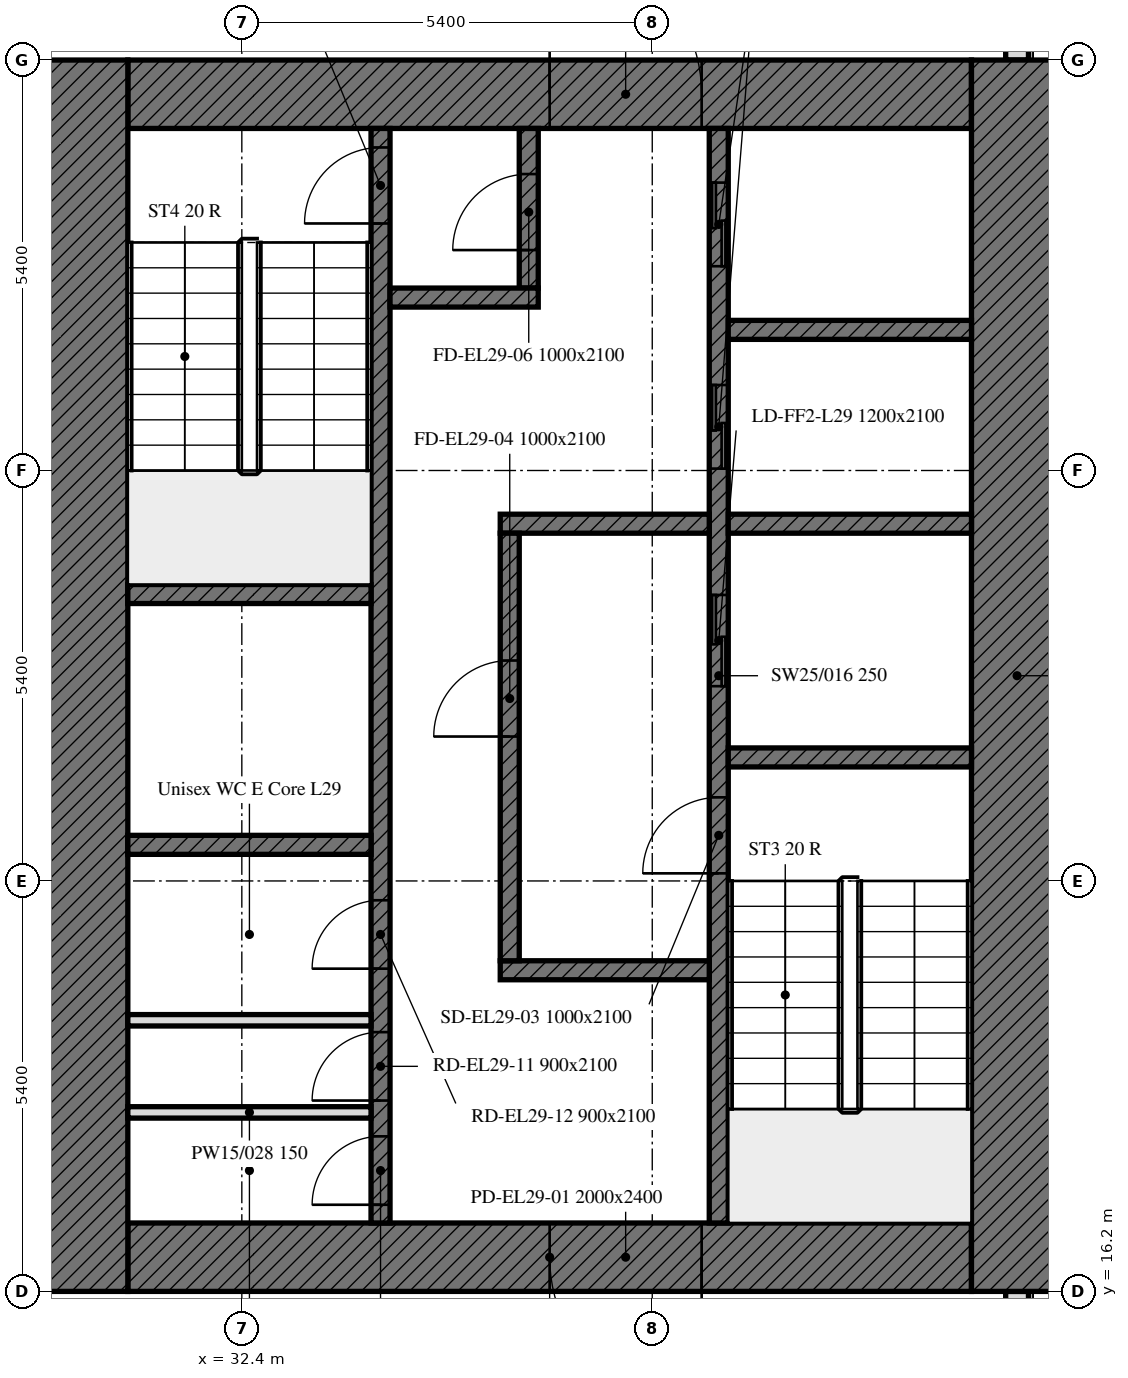
"""IFC4 building model, lengths in metres.
Left out: names, types, materials, properties, quantities, classifications, styles, units other than length and angle.
Written with IfcOpenShell. Run it as: python <this file> out.ifc"""

import sys

from ifc_helpers import new_model, si_unit, direction, frame, frame_2d, origin, place, context, subcontext, project, spatial, rectangle, extrude, element, fill, save


model = new_model("IFC4")
c1 = context("Model", 3, precision=1e-05, world=origin(), true_north=direction((0.0, 1.0)))
c2 = subcontext(c1, "Body", "Model", "MODEL_VIEW")
j1 = project(units=[si_unit("LENGTHUNIT", "METRE"), si_unit("PLANEANGLEUNIT", "RADIAN")], contexts=[c1])
p1 = place(None, origin())
s1 = spatial("IfcSite", under=j1, at=p1, CompositionType="ELEMENT")
p2 = place(p1, origin())
s2 = spatial("IfcBuilding", under=s1, at=p2, CompositionType="ELEMENT")
p3 = place(p2, frame((0.0, 0.0, 122.0)))
s3 = spatial("IfcBuildingStorey", under=s2, at=p3, CompositionType="ELEMENT", Elevation=122.0)
p4 = place(p3, frame((42.6, 10.986, 0.0), z_axis=(0.0, 0.0, 1.0), x_axis=(0.0, 1.0, 0.0)))
e1 = element("IfcWall", 1, at=p4, inside=s3, PredefinedType="SOLIDWALL", context=c2, shape_type="SweptSolid", body=[
    extrude(rectangle(XDim=5.214, YDim=0.3, at=frame_2d((2.607, 0.0))), origin(), (0.0, 0.0, 1.0), 3.3),
])
p5 = place(p3, frame((42.6, 32.4, 0.0), z_axis=(0.0, 0.0, 1.0), x_axis=(0.0, 1.0, 0.0)))
e2 = element("IfcWall", 2, at=p5, inside=s3, PredefinedType="SOLIDWALL", context=c2, shape_type="SweptSolid", body=[
    extrude(rectangle(XDim=10.614, YDim=0.3, at=frame_2d((5.307, 0.0))), origin(), (0.0, 0.0, 1.0), 3.3),
])
p6 = place(p5, frame((6.4, 0.0, 0.9)))
e3 = element("IfcOpeningElement", 3, at=p6, cuts=e2, PredefinedType="OPENING", context=c2, shape_type="SweptSolid", body=[
    extrude(rectangle(XDim=3.4, YDim=1.7, at=frame_2d((1.7, 0.85))), frame((0.0, 0.16, 0.0), z_axis=(0.0, -1.0, 0.0), x_axis=(1.0, 0.0, 0.0)), (0.0, 0.0, 1.0), 0.32),
])
p7 = place(p3, frame((42.0, 16.65, 0.0), z_axis=(0.0, 0.0, 1.0), x_axis=(-1.0, 0.0, 0.0)))
e4 = element("IfcWall", 4, at=p7, inside=s3, PredefinedType="SOLIDWALL", context=c2, shape_type="SweptSolid", body=[
    extrude(rectangle(XDim=11.1, YDim=0.9, at=frame_2d((5.55, 0.0))), origin(), (0.0, 0.0, 1.0), 3.3),
])
p8 = place(p7, frame((3.55, 0.0, 0.0)))
e5 = element("IfcOpeningElement", 5, at=p8, cuts=e4, PredefinedType="OPENING", context=c2, shape_type="SweptSolid", body=[
    extrude(rectangle(XDim=2.0, YDim=2.4, at=frame_2d((1.0, 1.2))), frame((0.0, 0.45, 0.0), z_axis=(0.0, -1.0, 0.0), x_axis=(1.0, 0.0, 0.0)), (0.0, 0.0, 1.0), 0.9),
])
p9 = place(p3, frame((30.9, 31.95, 0.0), z_axis=(0.0, 0.0, 1.0), x_axis=(1.0, 0.0, 0.0)))
e6 = element("IfcWall", 6, at=p9, inside=s3, PredefinedType="SOLIDWALL", context=c2, shape_type="SweptSolid", body=[
    extrude(rectangle(XDim=11.1, YDim=0.9, at=frame_2d((5.55, 0.0))), origin(), (0.0, 0.0, 1.0), 3.3),
])
p10 = place(p9, frame((5.55, 0.0, 0.0)))
e7 = element("IfcOpeningElement", 7, at=p10, cuts=e6, PredefinedType="OPENING", context=c2, shape_type="SweptSolid", body=[
    extrude(rectangle(XDim=2.0, YDim=2.4, at=frame_2d((1.0, 1.2))), frame((0.0, 0.45, 0.0), z_axis=(0.0, -1.0, 0.0), x_axis=(1.0, 0.0, 0.0)), (0.0, 0.0, 1.0), 0.9),
])
for number, where, z_axis, x_axis in (
    (8, (42.6, 32.4, 0.0), (0.0, 0.0, 1.0), (0.0, -1.0, 0.0)),
    (9, (30.3, 16.2, 0.0), (0.0, 0.0, 1.0), (0.0, 1.0, 0.0)),
):
    element("IfcWall", number, at=place(p3, frame(where, z_axis=z_axis, x_axis=x_axis)), inside=s3, PredefinedType="SOLIDWALL", context=c2, shape_type="SweptSolid", body=[
        extrude(rectangle(XDim=16.2, YDim=1.2, at=frame_2d((8.1, 0.0))), origin(), (0.0, 0.0, 1.0), 3.3),
    ])
p11 = place(p3, frame((38.675, 17.1, 0.0), z_axis=(0.0, 0.0, 1.0), x_axis=(0.0, 1.0, 0.0)))
e10 = element("IfcWall", 10, at=p11, inside=s3, PredefinedType="SOLIDWALL", context=c2, shape_type="SweptSolid", body=[
    extrude(rectangle(XDim=14.4, YDim=0.25, at=frame_2d((7.2, 0.0))), origin(), (0.0, 0.0, 1.0), 3.3),
])
p12 = place(p11, frame((4.6, 0.0, 0.0)))
e11 = element("IfcOpeningElement", 11, at=p12, cuts=e10, PredefinedType="OPENING", context=c2, shape_type="SweptSolid", body=[
    extrude(rectangle(XDim=1.0, YDim=2.1, at=frame_2d((0.5, 1.05))), frame((0.0, 0.125, 0.0), z_axis=(0.0, -1.0, 0.0), x_axis=(1.0, 0.0, 0.0)), (0.0, 0.0, 1.0), 0.25),
])
p13 = place(p11, frame((7.062, 0.0, 0.0)))
e12 = element("IfcOpeningElement", 12, at=p13, cuts=e10, PredefinedType="OPENING", context=c2, shape_type="SweptSolid", body=[
    extrude(rectangle(XDim=1.2, YDim=2.1, at=frame_2d((0.6, 1.05))), frame((0.0, 0.125, 0.0), z_axis=(0.0, -1.0, 0.0), x_axis=(1.0, 0.0, 0.0)), (0.0, 0.0, 1.0), 0.25),
])
p14 = place(p11, frame((9.925, 0.0, 0.0)))
e13 = element("IfcOpeningElement", 13, at=p14, cuts=e10, PredefinedType="OPENING", context=c2, shape_type="SweptSolid", body=[
    extrude(rectangle(XDim=1.1, YDim=2.1, at=frame_2d((0.55, 1.05))), frame((0.0, 0.125, 0.0), z_axis=(0.0, -1.0, 0.0), x_axis=(1.0, 0.0, 0.0)), (0.0, 0.0, 1.0), 0.25),
])
p15 = place(p11, frame((12.587, 0.0, 0.0)))
e14 = element("IfcOpeningElement", 14, at=p15, cuts=e10, PredefinedType="OPENING", context=c2, shape_type="SweptSolid", body=[
    extrude(rectangle(XDim=1.1, YDim=2.1, at=frame_2d((0.55, 1.05))), frame((0.0, 0.125, 0.0), z_axis=(0.0, -1.0, 0.0), x_axis=(1.0, 0.0, 0.0)), (0.0, 0.0, 1.0), 0.25),
])
p16 = place(p3, frame((34.225, 17.1, 0.0), z_axis=(0.0, 0.0, 1.0), x_axis=(0.0, 1.0, 0.0)))
e15 = element("IfcWall", 15, at=p16, inside=s3, PredefinedType="SOLIDWALL", context=c2, shape_type="SweptSolid", body=[
    extrude(rectangle(XDim=14.4, YDim=0.25, at=frame_2d((7.2, 0.0))), origin(), (0.0, 0.0, 1.0), 3.3),
])
p17 = place(p16, frame((13.15, 0.0, 0.0)))
e16 = element("IfcOpeningElement", 16, at=p17, cuts=e15, PredefinedType="OPENING", context=c2, shape_type="SweptSolid", body=[
    extrude(rectangle(XDim=1.0, YDim=2.1, at=frame_2d((0.5, 1.05))), frame((0.0, 0.125, 0.0), z_axis=(0.0, -1.0, 0.0), x_axis=(1.0, 0.0, 0.0)), (0.0, 0.0, 1.0), 0.25),
])
p18 = place(p16, frame((0.24, 0.0, 0.0)))
e17 = element("IfcOpeningElement", 17, at=p18, cuts=e15, PredefinedType="OPENING", context=c2, shape_type="SweptSolid", body=[
    extrude(rectangle(XDim=0.9, YDim=2.1, at=frame_2d((0.45, 1.05))), frame((0.0, 0.125, 0.0), z_axis=(0.0, -1.0, 0.0), x_axis=(1.0, 0.0, 0.0)), (0.0, 0.0, 1.0), 0.25),
])
p19 = place(p16, frame((1.611, 0.0, 0.0)))
e18 = element("IfcOpeningElement", 18, at=p19, cuts=e15, PredefinedType="OPENING", context=c2, shape_type="SweptSolid", body=[
    extrude(rectangle(XDim=0.9, YDim=2.1, at=frame_2d((0.45, 1.05))), frame((0.0, 0.125, 0.0), z_axis=(0.0, -1.0, 0.0), x_axis=(1.0, 0.0, 0.0)), (0.0, 0.0, 1.0), 0.25),
])
p20 = place(p16, frame((3.346, 0.0, 0.0)))
e19 = element("IfcOpeningElement", 19, at=p20, cuts=e15, PredefinedType="OPENING", context=c2, shape_type="SweptSolid", body=[
    extrude(rectangle(XDim=0.9, YDim=2.1, at=frame_2d((0.45, 1.05))), frame((0.0, 0.125, 0.0), z_axis=(0.0, -1.0, 0.0), x_axis=(1.0, 0.0, 0.0)), (0.0, 0.0, 1.0), 0.25),
])
p21 = place(p3, frame((38.8, 23.225, 0.0), z_axis=(0.0, 0.0, 1.0), x_axis=(1.0, 0.0, 0.0)))
e20 = element("IfcWall", 20, at=p21, inside=s3, PredefinedType="SOLIDWALL", context=c2, shape_type="SweptSolid", body=[
    extrude(rectangle(XDim=3.2, YDim=0.25, at=frame_2d((1.6, 0.0))), origin(), (0.0, 0.0, 1.0), 3.3),
])
for number, where, z_axis, x_axis in (
    (21, (30.9, 25.375, 0.0), (0.0, 0.0, 1.0), (1.0, 0.0, 0.0)),
    (22, (30.9, 22.075, 0.0), (0.0, 0.0, 1.0), (1.0, 0.0, 0.0)),
):
    element("IfcWall", number, at=place(p3, frame(where, z_axis=z_axis, x_axis=x_axis)), inside=s3, PredefinedType="SOLIDWALL", context=c2, shape_type="SweptSolid", body=[
        extrude(rectangle(XDim=3.2, YDim=0.25, at=frame_2d((1.6, 0.0))), origin(), (0.0, 0.0, 1.0), 3.3),
    ])
p22 = place(p3, frame((38.8, 26.3, 0.0), z_axis=(0.0, 0.0, 1.0), x_axis=(1.0, 0.0, 0.0)))
e23 = element("IfcWall", 23, at=p22, inside=s3, PredefinedType="SOLIDWALL", context=c2, shape_type="SweptSolid", body=[
    extrude(rectangle(XDim=3.2, YDim=0.25, at=frame_2d((1.6, 0.0))), origin(), (0.0, 0.0, 1.0), 3.3),
])
for number, where, z_axis, x_axis in (
    (24, (35.8, 26.3, 0.0), (0.0, 0.0, 1.0), (1.0, 0.0, 0.0)),
    (25, (35.8, 20.425, 0.0), (0.0, 0.0, 1.0), (1.0, 0.0, 0.0)),
):
    element("IfcWall", number, at=place(p3, frame(where, z_axis=z_axis, x_axis=x_axis)), inside=s3, PredefinedType="SOLIDWALL", context=c2, shape_type="SweptSolid", body=[
        extrude(rectangle(XDim=2.75, YDim=0.25, at=frame_2d((1.375, 0.0))), origin(), (0.0, 0.0, 1.0), 3.3),
    ])
p23 = place(p3, frame((36.175, 29.4, 0.0), z_axis=(0.0, 0.0, 1.0), x_axis=(0.0, 1.0, 0.0)))
e26 = element("IfcWall", 26, at=p23, inside=s3, PredefinedType="SOLIDWALL", context=c2, shape_type="SweptSolid", body=[
    extrude(rectangle(XDim=2.1, YDim=0.25, at=frame_2d((1.05, 0.0))), origin(), (0.0, 0.0, 1.0), 3.3),
])
p24 = place(p23, frame((0.5, 0.0, 0.0)))
e27 = element("IfcOpeningElement", 27, at=p24, cuts=e26, PredefinedType="OPENING", context=c2, shape_type="SweptSolid", body=[
    extrude(rectangle(XDim=1.0, YDim=2.1, at=frame_2d((0.5, 1.05))), frame((0.0, 0.125, 0.0), z_axis=(0.0, -1.0, 0.0), x_axis=(1.0, 0.0, 0.0)), (0.0, 0.0, 1.0), 0.25),
])
p25 = place(p3, frame((34.35, 29.275, 0.0), z_axis=(0.0, 0.0, 1.0), x_axis=(1.0, 0.0, 0.0)))
e28 = element("IfcWall", 28, at=p25, inside=s3, PredefinedType="SOLIDWALL", context=c2, shape_type="SweptSolid", body=[
    extrude(rectangle(XDim=1.95, YDim=0.25, at=frame_2d((0.975, 0.0))), origin(), (0.0, 0.0, 1.0), 3.3),
])
p26 = place(p3, frame((35.925, 20.55, 0.0), z_axis=(0.0, 0.0, 1.0), x_axis=(0.0, 1.0, 0.0)))
e29 = element("IfcWall", 29, at=p26, inside=s3, PredefinedType="SOLIDWALL", context=c2, shape_type="SweptSolid", body=[
    extrude(rectangle(XDim=5.625, YDim=0.25, at=frame_2d((2.812, 0.0))), origin(), (0.0, 0.0, 1.0), 3.3),
])
p27 = place(p26, frame((2.95, 0.0, 0.0)))
e30 = element("IfcOpeningElement", 30, at=p27, cuts=e29, PredefinedType="OPENING", context=c2, shape_type="SweptSolid", body=[
    extrude(rectangle(XDim=1.0, YDim=2.1, at=frame_2d((0.5, 1.05))), frame((0.0, 0.125, 0.0), z_axis=(0.0, -1.0, 0.0), x_axis=(1.0, 0.0, 0.0)), (0.0, 0.0, 1.0), 0.25),
])
p28 = place(p3, frame((38.8, 28.85, 0.0), z_axis=(0.0, 0.0, 1.0), x_axis=(1.0, 0.0, 0.0)))
e31 = element("IfcWall", 31, at=p28, inside=s3, PredefinedType="SOLIDWALL", context=c2, shape_type="SweptSolid", body=[
    extrude(rectangle(XDim=3.2, YDim=0.25, at=frame_2d((1.6, 0.0))), origin(), (0.0, 0.0, 1.0), 3.3),
])
for number, where, z_axis, x_axis in (
    (32, (30.9, 18.555, 0.0), (0.0, 0.0, 1.0), (1.0, 0.0, 0.0)),
    (33, (30.9, 19.767, 0.0), (0.0, 0.0, 1.0), (1.0, 0.0, 0.0)),
):
    element("IfcWall", number, at=place(p3, frame(where, z_axis=z_axis, x_axis=x_axis)), inside=s3, PredefinedType="PARTITIONING", context=c2, shape_type="SweptSolid", body=[
        extrude(rectangle(XDim=3.2, YDim=0.15, at=frame_2d((1.6, 0.0))), origin(), (0.0, 0.0, 1.0), 3.3),
    ])
p29 = place(p8, origin())
e34 = element("IfcDoor", 34, at=p29, inside=s3, OperationType="DOUBLE_DOOR_SINGLE_SWING", PredefinedType="DOOR", context=c2, shape_type="SweptSolid", body=[
    extrude(rectangle(XDim=2.0, YDim=2.4, at=frame_2d((1.0, 1.2))), frame((0.0, 0.025, 0.0), z_axis=(0.0, -1.0, 0.0), x_axis=(1.0, 0.0, 0.0)), (0.0, 0.0, 1.0), 0.05),
])
fill(e5, e34)
p30 = place(p10, origin())
e35 = element("IfcDoor", 35, at=p30, inside=s3, OperationType="DOUBLE_DOOR_SINGLE_SWING", PredefinedType="DOOR", context=c2, shape_type="SweptSolid", body=[
    extrude(rectangle(XDim=2.0, YDim=2.4, at=frame_2d((1.0, 1.2))), frame((0.0, 0.025, 0.0), z_axis=(0.0, -1.0, 0.0), x_axis=(1.0, 0.0, 0.0)), (0.0, 0.0, 1.0), 0.05),
])
fill(e7, e35)
p31 = place(p12, origin())
e36 = element("IfcDoor", 36, at=p31, inside=s3, OperationType="SINGLE_SWING_LEFT", PredefinedType="DOOR", context=c2, shape_type="SweptSolid", body=[
    extrude(rectangle(XDim=1.0, YDim=2.1, at=frame_2d((0.5, 1.05))), frame((0.0, 0.025, 0.0), z_axis=(0.0, -1.0, 0.0), x_axis=(1.0, 0.0, 0.0)), (0.0, 0.0, 1.0), 0.05),
])
fill(e11, e36)
p32 = place(p27, origin())
e37 = element("IfcDoor", 37, at=p32, inside=s3, OperationType="SINGLE_SWING_LEFT", PredefinedType="DOOR", context=c2, shape_type="SweptSolid", body=[
    extrude(rectangle(XDim=1.0, YDim=2.1, at=frame_2d((0.5, 1.05))), frame((0.0, 0.025, 0.0), z_axis=(0.0, -1.0, 0.0), x_axis=(1.0, 0.0, 0.0)), (0.0, 0.0, 1.0), 0.05),
])
fill(e30, e37)
p33 = place(p17, origin())
e38 = element("IfcDoor", 38, at=p33, inside=s3, OperationType="SINGLE_SWING_LEFT", PredefinedType="DOOR", context=c2, shape_type="SweptSolid", body=[
    extrude(rectangle(XDim=1.0, YDim=2.1, at=frame_2d((0.5, 1.05))), frame((0.0, 0.025, 0.0), z_axis=(0.0, -1.0, 0.0), x_axis=(1.0, 0.0, 0.0)), (0.0, 0.0, 1.0), 0.05),
])
fill(e16, e38)
p34 = place(p24, origin())
e39 = element("IfcDoor", 39, at=p34, inside=s3, OperationType="SINGLE_SWING_LEFT", PredefinedType="DOOR", context=c2, shape_type="SweptSolid", body=[
    extrude(rectangle(XDim=1.0, YDim=2.1, at=frame_2d((0.5, 1.05))), frame((0.0, 0.025, 0.0), z_axis=(0.0, -1.0, 0.0), x_axis=(1.0, 0.0, 0.0)), (0.0, 0.0, 1.0), 0.05),
])
fill(e27, e39)
p35 = place(p13, origin())
e40 = element("IfcDoor", 40, at=p35, inside=s3, OperationType="DOUBLE_DOOR_SLIDING", PredefinedType="DOOR", context=c2, shape_type="SweptSolid", body=[
    extrude(rectangle(XDim=1.2, YDim=2.1, at=frame_2d((0.6, 1.05))), frame((0.0, 0.025, 0.0), z_axis=(0.0, -1.0, 0.0), x_axis=(1.0, 0.0, 0.0)), (0.0, 0.0, 1.0), 0.05),
])
fill(e12, e40)
p36 = place(p14, origin())
e41 = element("IfcDoor", 41, at=p36, inside=s3, OperationType="DOUBLE_DOOR_SLIDING", PredefinedType="DOOR", context=c2, shape_type="SweptSolid", body=[
    extrude(rectangle(XDim=1.1, YDim=2.1, at=frame_2d((0.55, 1.05))), frame((0.0, 0.025, 0.0), z_axis=(0.0, -1.0, 0.0), x_axis=(1.0, 0.0, 0.0)), (0.0, 0.0, 1.0), 0.05),
])
fill(e13, e41)
p37 = place(p15, origin())
e42 = element("IfcDoor", 42, at=p37, inside=s3, OperationType="DOUBLE_DOOR_SLIDING", PredefinedType="DOOR", context=c2, shape_type="SweptSolid", body=[
    extrude(rectangle(XDim=1.1, YDim=2.1, at=frame_2d((0.55, 1.05))), frame((0.0, 0.025, 0.0), z_axis=(0.0, -1.0, 0.0), x_axis=(1.0, 0.0, 0.0)), (0.0, 0.0, 1.0), 0.05),
])
fill(e14, e42)
p38 = place(p18, origin())
e43 = element("IfcDoor", 43, at=p38, inside=s3, OperationType="SINGLE_SWING_LEFT", PredefinedType="DOOR", context=c2, shape_type="SweptSolid", body=[
    extrude(rectangle(XDim=0.9, YDim=2.1, at=frame_2d((0.45, 1.05))), frame((0.0, 0.025, 0.0), z_axis=(0.0, -1.0, 0.0), x_axis=(1.0, 0.0, 0.0)), (0.0, 0.0, 1.0), 0.05),
])
fill(e17, e43)
p39 = place(p19, origin())
e44 = element("IfcDoor", 44, at=p39, inside=s3, OperationType="SINGLE_SWING_LEFT", PredefinedType="DOOR", context=c2, shape_type="SweptSolid", body=[
    extrude(rectangle(XDim=0.9, YDim=2.1, at=frame_2d((0.45, 1.05))), frame((0.0, 0.025, 0.0), z_axis=(0.0, -1.0, 0.0), x_axis=(1.0, 0.0, 0.0)), (0.0, 0.0, 1.0), 0.05),
])
fill(e18, e44)
p40 = place(p20, origin())
e45 = element("IfcDoor", 45, at=p40, inside=s3, OperationType="SINGLE_SWING_LEFT", PredefinedType="DOOR", context=c2, shape_type="SweptSolid", body=[
    extrude(rectangle(XDim=0.9, YDim=2.1, at=frame_2d((0.45, 1.05))), frame((0.0, 0.025, 0.0), z_axis=(0.0, -1.0, 0.0), x_axis=(1.0, 0.0, 0.0)), (0.0, 0.0, 1.0), 0.05),
])
fill(e19, e45)
save(model, sys.argv[1])
